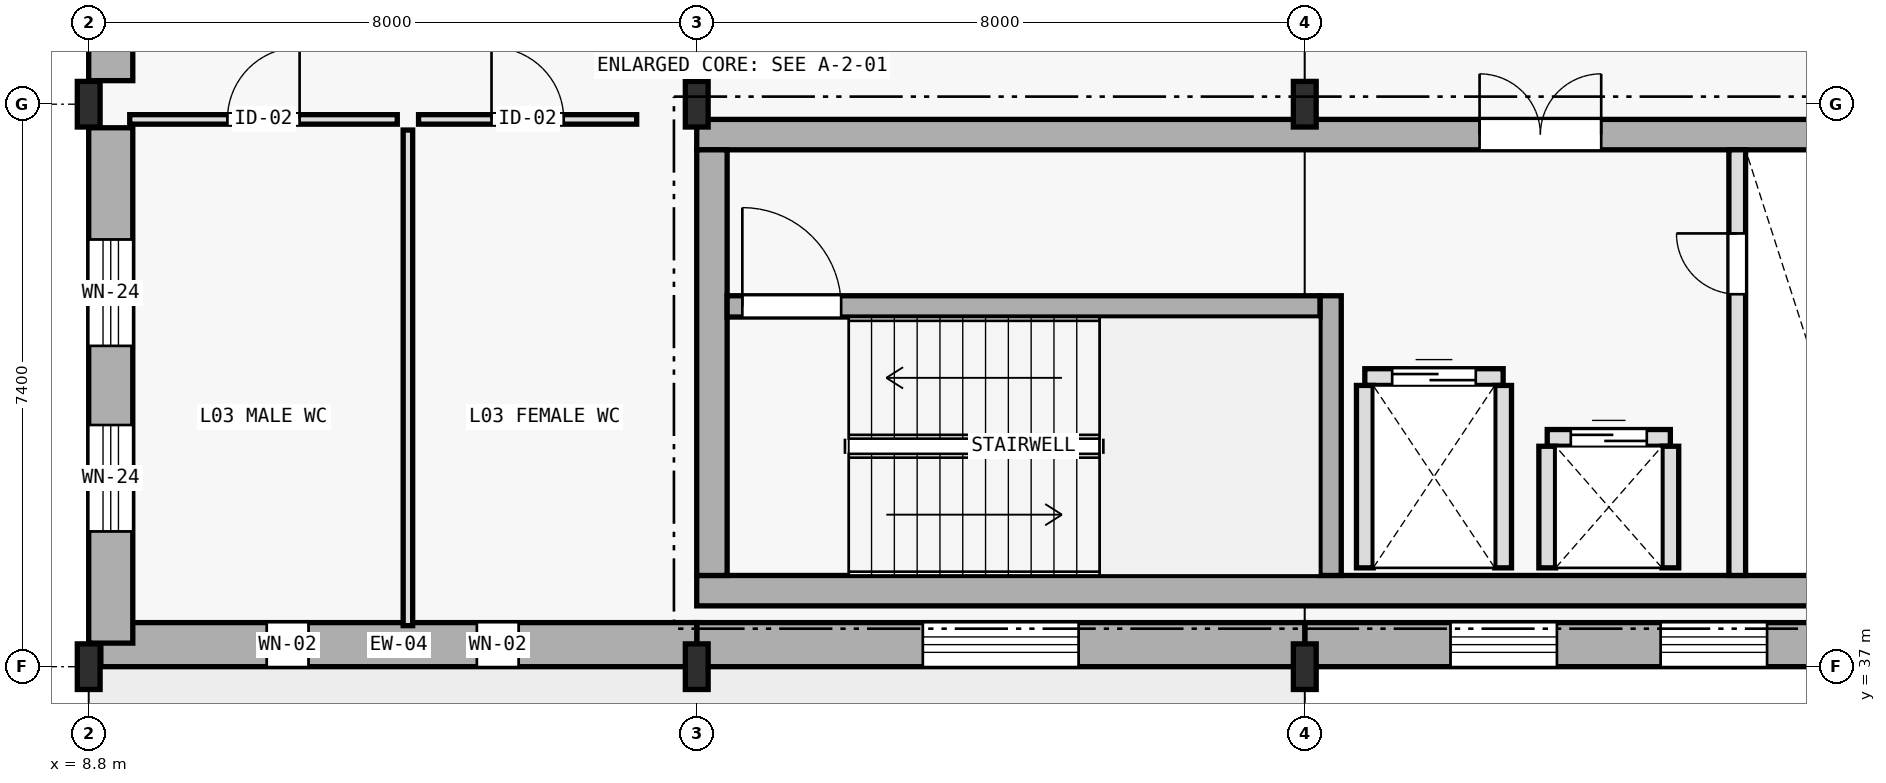
"""IFC4 building model, lengths in metres.
Left out: names, types, materials, properties, quantities, classifications, styles, units other than length and angle.
Written with IfcOpenShell. Run it as: python <this file> out.ifc"""

import sys

from ifc_helpers import new_model, si_unit, direction, frame, frame_2d, origin, origin_2d, place, context, subcontext, project, spatial, rectangle, i_section, extrude, element, fill, save


model = new_model("IFC4")
c1 = context("Model", 3, precision=1e-05, world=origin(), true_north=direction((0.0, 1.0)))
c2 = subcontext(c1, "Body", "Model", "MODEL_VIEW")
j1 = project(units=[si_unit("LENGTHUNIT", "METRE"), si_unit("PLANEANGLEUNIT", "RADIAN")], contexts=[c1])
p1 = place(None, origin())
s1 = spatial("IfcSite", under=j1, at=p1, CompositionType="ELEMENT")
p2 = place(p1, origin())
s2 = spatial("IfcBuilding", under=s1, at=p2, CompositionType="ELEMENT")
p3 = place(p2, frame((0.0, 0.0, 9.9)))
s3 = spatial("IfcBuildingStorey", under=s2, at=p3, CompositionType="ELEMENT", Elevation=9.9)
p4 = place(p3, frame((16.8, 38.0, 0.0), z_axis=(0.0, 0.0, 1.0), x_axis=(1.0, 0.0, 0.0)))
e1 = element("IfcWall", 1, at=p4, inside=s3, PredefinedType="SHEAR", context=c2, shape_type="SweptSolid", body=[
    extrude(rectangle(XDim=16.4, YDim=0.4, at=frame_2d((8.2, 0.0))), origin(), (0.0, 0.0, 1.0), 4.195),
])
p5 = place(p3, frame((16.8, 44.0, 0.0), z_axis=(0.0, 0.0, 1.0), x_axis=(1.0, 0.0, 0.0)))
e2 = element("IfcWall", 2, at=p5, inside=s3, PredefinedType="SHEAR", context=c2, shape_type="SweptSolid", body=[
    extrude(rectangle(XDim=16.4, YDim=0.4, at=frame_2d((8.2, 0.0))), origin(), (0.0, 0.0, 1.0), 4.195),
])
p6 = place(p5, frame((10.3, 0.0, 0.0)))
e3 = element("IfcOpeningElement", 3, at=p6, cuts=e2, PredefinedType="OPENING", context=c2, shape_type="SweptSolid", body=[
    extrude(rectangle(XDim=1.6, YDim=2.2, at=frame_2d((0.8, 1.1))), frame((0.0, 0.21, 0.0), z_axis=(0.0, -1.0, 0.0), x_axis=(1.0, 0.0, 0.0)), (0.0, 0.0, 1.0), 0.42),
])
p7 = place(p3, frame((17.0, 38.2, 0.0), z_axis=(0.0, 0.0, 1.0), x_axis=(0.0, 1.0, 0.0)))
e4 = element("IfcWall", 4, at=p7, inside=s3, PredefinedType="SHEAR", context=c2, shape_type="SweptSolid", body=[
    extrude(rectangle(XDim=5.6, YDim=0.4, at=frame_2d((2.8, 0.0))), origin(), (0.0, 0.0, 1.0), 4.195),
])
p8 = place(p3, frame((25.14, 38.2, 0.0), z_axis=(0.0, 0.0, 1.0), x_axis=(0.0, 1.0, 0.0)))
e5 = element("IfcWall", 5, at=p8, inside=s3, PredefinedType="SHEAR", context=c2, shape_type="SweptSolid", body=[
    extrude(rectangle(XDim=3.68, YDim=0.28, at=frame_2d((1.84, 0.0))), origin(), (0.0, 0.0, 1.0), 4.195),
])
p9 = place(p3, frame((17.2, 41.74, 0.0), z_axis=(0.0, 0.0, 1.0), x_axis=(1.0, 0.0, 0.0)))
e6 = element("IfcWall", 6, at=p9, inside=s3, PredefinedType="SHEAR", context=c2, shape_type="SweptSolid", body=[
    extrude(rectangle(XDim=7.8, YDim=0.28, at=frame_2d((3.9, 0.0))), origin(), (0.0, 0.0, 1.0), 4.195),
])
p10 = place(p9, frame((0.2, 0.0, 0.0)))
e7 = element("IfcOpeningElement", 7, at=p10, cuts=e6, PredefinedType="OPENING", context=c2, shape_type="SweptSolid", body=[
    extrude(rectangle(XDim=1.3, YDim=2.2, at=frame_2d((0.65, 1.1))), frame((0.0, 0.15, 0.0), z_axis=(0.0, -1.0, 0.0), x_axis=(1.0, 0.0, 0.0)), (0.0, 0.0, 1.0), 0.3),
])
for number, where, z_axis, x_axis in (
    (8, (8.8, 37.0, 0.0), (0.0, 0.0, 1.0), (1.0, 0.0, 0.0)),
    (9, (8.8, 44.4, 0.0), (0.0, 0.0, 1.0), (1.0, 0.0, 0.0)),
    (10, (16.8, 37.0, 0.0), (0.0, 0.0, 1.0), (1.0, 0.0, 0.0)),
    (11, (16.8, 44.4, 0.0), (0.0, 0.0, 1.0), (1.0, 0.0, 0.0)),
    (12, (24.8, 37.0, 0.0), (0.0, 0.0, 1.0), (1.0, 0.0, 0.0)),
    (13, (24.8, 44.4, 0.0), (0.0, 0.0, 1.0), (1.0, 0.0, 0.0)),
):
    element("IfcColumn", number, at=place(p3, frame(where, z_axis=z_axis, x_axis=x_axis)), inside=s3, PredefinedType="COLUMN", context=c2, shape_type="SweptSolid", body=[
        extrude(i_section(OverallWidth=0.3, OverallDepth=0.6, WebThickness=0.015, FlangeThickness=0.03, FilletRadius=0.027, at=origin_2d()), origin(), (0.0, 0.0, 1.0), 4.2),
    ])
p11 = place(p3, frame((32.8, 37.29, 0.0), z_axis=(0.0, 0.0, 1.0), x_axis=(-1.0, 0.0, 0.0)))
e14 = element("IfcWall", 14, at=p11, inside=s3, PredefinedType="STANDARD", context=c2, shape_type="SweptSolid", body=[
    extrude(rectangle(XDim=8.0, YDim=0.58, at=frame_2d((4.0, 0.0))), origin(), (0.0, 0.0, 1.0), 3.955),
])
p12 = place(p11, frame((1.917, 0.0, 0.9)))
e15 = element("IfcOpeningElement", 15, at=p12, cuts=e14, PredefinedType="OPENING", context=c2, shape_type="SweptSolid", body=[
    extrude(rectangle(XDim=1.4, YDim=1.75, at=frame_2d((0.7, 0.875))), frame((0.0, 0.3, 0.0), z_axis=(0.0, -1.0, 0.0), x_axis=(1.0, 0.0, 0.0)), (0.0, 0.0, 1.0), 0.6),
])
p13 = place(p11, frame((4.682, 0.0, 0.9)))
e16 = element("IfcOpeningElement", 16, at=p13, cuts=e14, PredefinedType="OPENING", context=c2, shape_type="SweptSolid", body=[
    extrude(rectangle(XDim=1.4, YDim=1.75, at=frame_2d((0.7, 0.875))), frame((0.0, 0.3, 0.0), z_axis=(0.0, -1.0, 0.0), x_axis=(1.0, 0.0, 0.0)), (0.0, 0.0, 1.0), 0.6),
])
p14 = place(p3, frame((24.8, 37.29, 0.0), z_axis=(0.0, 0.0, 1.0), x_axis=(-1.0, 0.0, 0.0)))
e17 = element("IfcWall", 17, at=p14, inside=s3, PredefinedType="STANDARD", context=c2, shape_type="SweptSolid", body=[
    extrude(rectangle(XDim=8.0, YDim=0.58, at=frame_2d((4.0, 0.0))), origin(), (0.0, 0.0, 1.0), 3.955),
])
p15 = place(p14, frame((2.975, 0.0, 0.9)))
e18 = element("IfcOpeningElement", 18, at=p15, cuts=e17, PredefinedType="OPENING", context=c2, shape_type="SweptSolid", body=[
    extrude(rectangle(XDim=2.05, YDim=1.75, at=frame_2d((1.025, 0.875))), frame((0.0, 0.3, 0.0), z_axis=(0.0, -1.0, 0.0), x_axis=(1.0, 0.0, 0.0)), (0.0, 0.0, 1.0), 0.6),
])
p16 = place(p3, frame((16.8, 37.29, 0.0), z_axis=(0.0, 0.0, 1.0), x_axis=(-1.0, 0.0, 0.0)))
e19 = element("IfcWall", 19, at=p16, inside=s3, PredefinedType="STANDARD", context=c2, shape_type="SweptSolid", body=[
    extrude(rectangle(XDim=7.84, YDim=0.58, at=frame_2d((3.92, 0.0))), origin(), (0.0, 0.0, 1.0), 3.955),
])
p17 = place(p16, frame((2.343, 0.0, 0.9)))
e20 = element("IfcOpeningElement", 20, at=p17, cuts=e19, PredefinedType="OPENING", context=c2, shape_type="SweptSolid", body=[
    extrude(rectangle(XDim=0.55, YDim=1.75, at=frame_2d((0.275, 0.875))), frame((0.0, 0.3, 0.0), z_axis=(0.0, -1.0, 0.0), x_axis=(1.0, 0.0, 0.0)), (0.0, 0.0, 1.0), 0.6),
])
p18 = place(p16, frame((5.107, 0.0, 0.9)))
e21 = element("IfcOpeningElement", 21, at=p18, cuts=e19, PredefinedType="OPENING", context=c2, shape_type="SweptSolid", body=[
    extrude(rectangle(XDim=0.55, YDim=1.75, at=frame_2d((0.275, 0.875))), frame((0.0, 0.3, 0.0), z_axis=(0.0, -1.0, 0.0), x_axis=(1.0, 0.0, 0.0)), (0.0, 0.0, 1.0), 0.6),
])
p19 = place(p3, frame((9.09, 37.31, 0.0), z_axis=(0.0, 0.0, 1.0), x_axis=(0.0, 1.0, 0.0)))
e22 = element("IfcWall", 22, at=p19, inside=s3, PredefinedType="STANDARD", context=c2, shape_type="SweptSolid", body=[
    extrude(rectangle(XDim=6.78, YDim=0.58, at=frame_2d((3.39, 0.0))), origin(), (0.0, 0.0, 1.0), 3.955),
])
p20 = place(p19, frame((1.469, 0.0, 0.9)))
e23 = element("IfcOpeningElement", 23, at=p20, cuts=e22, PredefinedType="OPENING", context=c2, shape_type="SweptSolid", body=[
    extrude(rectangle(XDim=1.4, YDim=1.75, at=frame_2d((0.7, 0.875))), frame((0.0, 0.3, 0.0), z_axis=(0.0, -1.0, 0.0), x_axis=(1.0, 0.0, 0.0)), (0.0, 0.0, 1.0), 0.6),
])
p21 = place(p19, frame((3.91, 0.0, 0.9)))
e24 = element("IfcOpeningElement", 24, at=p21, cuts=e22, PredefinedType="OPENING", context=c2, shape_type="SweptSolid", body=[
    extrude(rectangle(XDim=1.4, YDim=1.75, at=frame_2d((0.7, 0.875))), frame((0.0, 0.3, 0.0), z_axis=(0.0, -1.0, 0.0), x_axis=(1.0, 0.0, 0.0)), (0.0, 0.0, 1.0), 0.6),
])
p22 = place(p3, frame((9.09, 44.71, 0.0), z_axis=(0.0, 0.0, 1.0), x_axis=(0.0, 1.0, 0.0)))
e25 = element("IfcWall", 25, at=p22, inside=s3, PredefinedType="STANDARD", context=c2, shape_type="SweptSolid", body=[
    extrude(rectangle(XDim=6.78, YDim=0.58, at=frame_2d((3.39, 0.0))), origin(), (0.0, 0.0, 1.0), 3.955),
])
p23 = place(p22, frame((2.365, 0.0, 0.9)))
e26 = element("IfcOpeningElement", 26, at=p23, cuts=e25, PredefinedType="OPENING", context=c2, shape_type="SweptSolid", body=[
    extrude(rectangle(XDim=2.05, YDim=1.75, at=frame_2d((1.025, 0.875))), frame((0.0, 0.3, 0.0), z_axis=(0.0, -1.0, 0.0), x_axis=(1.0, 0.0, 0.0)), (0.0, 0.0, 1.0), 0.6),
])
p24 = place(p3, frame((25.59, 40.81, 0.0), z_axis=(0.0, 0.0, 1.0), x_axis=(1.0, 0.0, 0.0)))
e27 = element("IfcWall", 27, at=p24, inside=s3, PredefinedType="PLUMBINGWALL", context=c2, shape_type="SweptSolid", body=[
    extrude(rectangle(XDim=1.82, YDim=0.22, at=frame_2d((0.91, 0.0))), origin(), (0.0, 0.0, 1.0), 3.92),
])
p25 = place(p24, frame((0.36, 0.0, 0.0)))
e28 = element("IfcOpeningElement", 28, at=p25, cuts=e27, PredefinedType="OPENING", context=c2, shape_type="SweptSolid", body=[
    extrude(rectangle(XDim=1.1, YDim=2.2, at=frame_2d((0.55, 1.1))), frame((0.0, 0.12, 0.0), z_axis=(0.0, -1.0, 0.0), x_axis=(1.0, 0.0, 0.0)), (0.0, 0.0, 1.0), 0.24),
])
for number, where, z_axis, x_axis in (
    (29, (25.59, 38.3, 0.0), (0.0, 0.0, 1.0), (0.0, 1.0, 0.0)),
    (30, (27.41, 38.3, 0.0), (0.0, 0.0, 1.0), (0.0, 1.0, 0.0)),
):
    element("IfcWall", number, at=place(p3, frame(where, z_axis=z_axis, x_axis=x_axis)), inside=s3, PredefinedType="PLUMBINGWALL", context=c2, shape_type="SweptSolid", body=[
        extrude(rectangle(XDim=2.4, YDim=0.22, at=frame_2d((1.2, 0.0))), origin(), (0.0, 0.0, 1.0), 3.92),
    ])
p26 = place(p3, frame((27.99, 40.01, 0.0), z_axis=(0.0, 0.0, 1.0), x_axis=(1.0, 0.0, 0.0)))
e31 = element("IfcWall", 31, at=p26, inside=s3, PredefinedType="PLUMBINGWALL", context=c2, shape_type="SweptSolid", body=[
    extrude(rectangle(XDim=1.62, YDim=0.22, at=frame_2d((0.81, 0.0))), origin(), (0.0, 0.0, 1.0), 3.92),
])
p27 = place(p26, frame((0.31, 0.0, 0.0)))
e32 = element("IfcOpeningElement", 32, at=p27, cuts=e31, PredefinedType="OPENING", context=c2, shape_type="SweptSolid", body=[
    extrude(rectangle(XDim=1.0, YDim=2.2, at=frame_2d((0.5, 1.1))), frame((0.0, 0.12, 0.0), z_axis=(0.0, -1.0, 0.0), x_axis=(1.0, 0.0, 0.0)), (0.0, 0.0, 1.0), 0.24),
])
for number, where, z_axis, x_axis in (
    (33, (27.99, 38.3, 0.0), (0.0, 0.0, 1.0), (0.0, 1.0, 0.0)),
    (34, (29.61, 38.3, 0.0), (0.0, 0.0, 1.0), (0.0, 1.0, 0.0)),
):
    element("IfcWall", number, at=place(p3, frame(where, z_axis=z_axis, x_axis=x_axis)), inside=s3, PredefinedType="PLUMBINGWALL", context=c2, shape_type="SweptSolid", body=[
        extrude(rectangle(XDim=1.6, YDim=0.22, at=frame_2d((0.8, 0.0))), origin(), (0.0, 0.0, 1.0), 3.92),
    ])
p28 = place(p3, frame((30.49, 38.2, 0.0), z_axis=(0.0, 0.0, 1.0), x_axis=(0.0, 1.0, 0.0)))
e35 = element("IfcWall", 35, at=p28, inside=s3, PredefinedType="PLUMBINGWALL", context=c2, shape_type="SweptSolid", body=[
    extrude(rectangle(XDim=5.6, YDim=0.22, at=frame_2d((2.8, 0.0))), origin(), (0.0, 0.0, 1.0), 3.92),
])
p29 = place(p28, frame((3.7, 0.0, 0.0)))
e36 = element("IfcOpeningElement", 36, at=p29, cuts=e35, PredefinedType="OPENING", context=c2, shape_type="SweptSolid", body=[
    extrude(rectangle(XDim=0.8, YDim=2.1, at=frame_2d((0.4, 1.05))), frame((0.0, 0.12, 0.0), z_axis=(0.0, -1.0, 0.0), x_axis=(1.0, 0.0, 0.0)), (0.0, 0.0, 1.0), 0.24),
])
p30 = place(p3, frame((9.34, 44.2, 0.0), z_axis=(0.0, 0.0, 1.0), x_axis=(1.0, 0.0, 0.0)))
e37 = element("IfcWall", 37, at=p30, inside=s3, PredefinedType="PARTITIONING", context=c2, shape_type="SweptSolid", body=[
    extrude(rectangle(XDim=3.52, YDim=0.125, at=frame_2d((1.76, 0.0))), origin(), (0.0, 0.0, 1.0), 2.735),
])
p31 = place(p30, frame((1.285, 0.0, 0.0)))
e38 = element("IfcOpeningElement", 38, at=p31, cuts=e37, PredefinedType="OPENING", context=c2, shape_type="SweptSolid", body=[
    extrude(rectangle(XDim=0.95, YDim=2.1, at=frame_2d((0.475, 1.05))), frame((0.0, 0.073, 0.0), z_axis=(0.0, -1.0, 0.0), x_axis=(1.0, 0.0, 0.0)), (0.0, 0.0, 1.0), 0.145),
])
p32 = place(p3, frame((13.0, 37.54, 0.0), z_axis=(0.0, 0.0, 1.0), x_axis=(0.0, 1.0, 0.0)))
e39 = element("IfcWall", 39, at=p32, inside=s3, PredefinedType="PARTITIONING", context=c2, shape_type="SweptSolid", body=[
    extrude(rectangle(XDim=6.52, YDim=0.125, at=frame_2d((3.26, 0.0))), origin(), (0.0, 0.0, 1.0), 3.92),
])
p33 = place(p3, frame((13.14, 44.2, 0.0), z_axis=(0.0, 0.0, 1.0), x_axis=(1.0, 0.0, 0.0)))
e40 = element("IfcWall", 40, at=p33, inside=s3, PredefinedType="PARTITIONING", context=c2, shape_type="SweptSolid", body=[
    extrude(rectangle(XDim=2.87, YDim=0.125, at=frame_2d((1.435, 0.0))), origin(), (0.0, 0.0, 1.0), 2.735),
])
p34 = place(p33, frame((0.96, 0.0, 0.0)))
e41 = element("IfcOpeningElement", 41, at=p34, cuts=e40, PredefinedType="OPENING", context=c2, shape_type="SweptSolid", body=[
    extrude(rectangle(XDim=0.95, YDim=2.1, at=frame_2d((0.475, 1.05))), frame((0.0, 0.073, 0.0), z_axis=(0.0, -1.0, 0.0), x_axis=(1.0, 0.0, 0.0)), (0.0, 0.0, 1.0), 0.145),
])
p35 = place(p12, origin())
e42 = element("IfcWindow", 42, at=p35, inside=s3, PartitioningType="SINGLE_PANEL", PredefinedType="WINDOW", context=c2, shape_type="SweptSolid", body=[
    extrude(rectangle(XDim=1.4, YDim=1.75, at=frame_2d((0.7, 0.875))), frame((0.0, 0.03, 0.0), z_axis=(0.0, -1.0, 0.0), x_axis=(1.0, 0.0, 0.0)), (0.0, 0.0, 1.0), 0.06),
])
fill(e15, e42)
p36 = place(p13, origin())
e43 = element("IfcWindow", 43, at=p36, inside=s3, PartitioningType="SINGLE_PANEL", PredefinedType="WINDOW", context=c2, shape_type="SweptSolid", body=[
    extrude(rectangle(XDim=1.4, YDim=1.75, at=frame_2d((0.7, 0.875))), frame((0.0, 0.03, 0.0), z_axis=(0.0, -1.0, 0.0), x_axis=(1.0, 0.0, 0.0)), (0.0, 0.0, 1.0), 0.06),
])
fill(e16, e43)
p37 = place(p15, origin())
e44 = element("IfcWindow", 44, at=p37, inside=s3, PartitioningType="SINGLE_PANEL", PredefinedType="WINDOW", context=c2, shape_type="SweptSolid", body=[
    extrude(rectangle(XDim=2.05, YDim=1.75, at=frame_2d((1.025, 0.875))), frame((0.0, 0.03, 0.0), z_axis=(0.0, -1.0, 0.0), x_axis=(1.0, 0.0, 0.0)), (0.0, 0.0, 1.0), 0.06),
])
fill(e18, e44)
p38 = place(p17, origin())
e45 = element("IfcWindow", 45, at=p38, inside=s3, PartitioningType="SINGLE_PANEL", PredefinedType="WINDOW", context=c2, shape_type="SweptSolid", body=[
    extrude(rectangle(XDim=0.55, YDim=1.75, at=frame_2d((0.275, 0.875))), frame((0.0, 0.03, 0.0), z_axis=(0.0, -1.0, 0.0), x_axis=(1.0, 0.0, 0.0)), (0.0, 0.0, 1.0), 0.06),
])
fill(e20, e45)
p39 = place(p18, origin())
e46 = element("IfcWindow", 46, at=p39, inside=s3, PartitioningType="SINGLE_PANEL", PredefinedType="WINDOW", context=c2, shape_type="SweptSolid", body=[
    extrude(rectangle(XDim=0.55, YDim=1.75, at=frame_2d((0.275, 0.875))), frame((0.0, 0.03, 0.0), z_axis=(0.0, -1.0, 0.0), x_axis=(1.0, 0.0, 0.0)), (0.0, 0.0, 1.0), 0.06),
])
fill(e21, e46)
p40 = place(p20, origin())
e47 = element("IfcWindow", 47, at=p40, inside=s3, PartitioningType="SINGLE_PANEL", PredefinedType="WINDOW", context=c2, shape_type="SweptSolid", body=[
    extrude(rectangle(XDim=1.4, YDim=1.75, at=frame_2d((0.7, 0.875))), frame((0.0, 0.03, 0.0), z_axis=(0.0, -1.0, 0.0), x_axis=(1.0, 0.0, 0.0)), (0.0, 0.0, 1.0), 0.06),
])
fill(e23, e47)
p41 = place(p21, origin())
e48 = element("IfcWindow", 48, at=p41, inside=s3, PartitioningType="SINGLE_PANEL", PredefinedType="WINDOW", context=c2, shape_type="SweptSolid", body=[
    extrude(rectangle(XDim=1.4, YDim=1.75, at=frame_2d((0.7, 0.875))), frame((0.0, 0.03, 0.0), z_axis=(0.0, -1.0, 0.0), x_axis=(1.0, 0.0, 0.0)), (0.0, 0.0, 1.0), 0.06),
])
fill(e24, e48)
p42 = place(p10, origin())
e49 = element("IfcDoor", 49, at=p42, inside=s3, OperationType="SINGLE_SWING_LEFT", PredefinedType="DOOR", context=c2, shape_type="SweptSolid", body=[
    extrude(rectangle(XDim=1.3, YDim=2.2, at=frame_2d((0.65, 1.1))), frame((0.0, 0.025, 0.0), z_axis=(0.0, -1.0, 0.0), x_axis=(1.0, 0.0, 0.0)), (0.0, 0.0, 1.0), 0.05),
])
fill(e7, e49)
p43 = place(p25, origin())
e50 = element("IfcDoor", 50, at=p43, inside=s3, OperationType="DOUBLE_DOOR_SLIDING", PredefinedType="DOOR", context=c2, shape_type="SweptSolid", body=[
    extrude(rectangle(XDim=1.1, YDim=2.2, at=frame_2d((0.55, 1.1))), frame((0.0, 0.025, 0.0), z_axis=(0.0, -1.0, 0.0), x_axis=(1.0, 0.0, 0.0)), (0.0, 0.0, 1.0), 0.05),
])
fill(e28, e50)
p44 = place(p27, origin())
e51 = element("IfcDoor", 51, at=p44, inside=s3, OperationType="DOUBLE_DOOR_SLIDING", PredefinedType="DOOR", context=c2, shape_type="SweptSolid", body=[
    extrude(rectangle(XDim=1.0, YDim=2.2, at=frame_2d((0.5, 1.1))), frame((0.0, 0.025, 0.0), z_axis=(0.0, -1.0, 0.0), x_axis=(1.0, 0.0, 0.0)), (0.0, 0.0, 1.0), 0.05),
])
fill(e32, e51)
p45 = place(p29, origin())
e52 = element("IfcDoor", 52, at=p45, inside=s3, OperationType="SINGLE_SWING_RIGHT", PredefinedType="DOOR", context=c2, shape_type="SweptSolid", body=[
    extrude(rectangle(XDim=0.8, YDim=2.1, at=frame_2d((0.4, 1.05))), frame((0.0, 0.025, 0.0), z_axis=(0.0, -1.0, 0.0), x_axis=(1.0, 0.0, 0.0)), (0.0, 0.0, 1.0), 0.05),
])
fill(e36, e52)
p46 = place(p6, origin())
e53 = element("IfcDoor", 53, at=p46, inside=s3, OperationType="DOUBLE_DOOR_SINGLE_SWING", PredefinedType="DOOR", context=c2, shape_type="SweptSolid", body=[
    extrude(rectangle(XDim=1.6, YDim=2.2, at=frame_2d((0.8, 1.1))), frame((0.0, 0.025, 0.0), z_axis=(0.0, -1.0, 0.0), x_axis=(1.0, 0.0, 0.0)), (0.0, 0.0, 1.0), 0.05),
])
fill(e3, e53)
p47 = place(p31, origin())
e54 = element("IfcDoor", 54, at=p47, inside=s3, OperationType="SINGLE_SWING_RIGHT", PredefinedType="DOOR", context=c2, shape_type="SweptSolid", body=[
    extrude(rectangle(XDim=0.95, YDim=2.1, at=frame_2d((0.475, 1.05))), frame((0.0, 0.025, 0.0), z_axis=(0.0, -1.0, 0.0), x_axis=(1.0, 0.0, 0.0)), (0.0, 0.0, 1.0), 0.05),
])
fill(e38, e54)
p48 = place(p34, origin())
e55 = element("IfcDoor", 55, at=p48, inside=s3, OperationType="SINGLE_SWING_LEFT", PredefinedType="DOOR", context=c2, shape_type="SweptSolid", body=[
    extrude(rectangle(XDim=0.95, YDim=2.1, at=frame_2d((0.475, 1.05))), frame((0.0, 0.025, 0.0), z_axis=(0.0, -1.0, 0.0), x_axis=(1.0, 0.0, 0.0)), (0.0, 0.0, 1.0), 0.05),
])
fill(e41, e55)
save(model, sys.argv[1])
